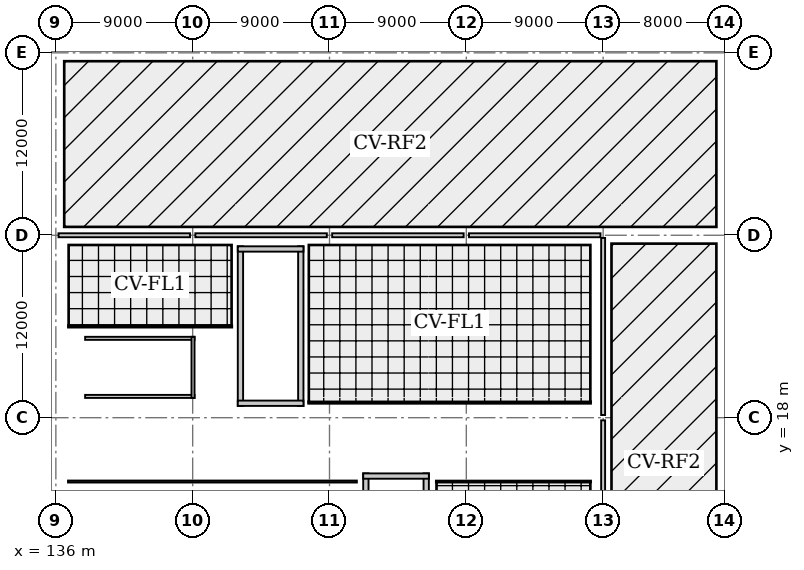
"""IFC4 building model, lengths in metres.
Left out: names, types, materials, properties, quantities, classifications, styles, units other than length and angle.
Written with IfcOpenShell. Run it as: python <this file> out.ifc"""

import sys

from ifc_helpers import new_model, si_unit, direction, frame, frame_2d, origin, origin_2d, place, context, subcontext, project, spatial, rectangle, i_section, extrude, element, fill, save


model = new_model("IFC4")
c1 = context("Model", 3, precision=1e-05, world=origin(), true_north=direction((0.0, 1.0)))
c2 = subcontext(c1, "Body", "Model", "MODEL_VIEW")
j1 = project(units=[si_unit("LENGTHUNIT", "METRE"), si_unit("PLANEANGLEUNIT", "RADIAN")], contexts=[c1])
p1 = place(None, origin())
s1 = spatial("IfcSite", under=j1, at=p1, CompositionType="ELEMENT")
p2 = place(p1, origin())
s2 = spatial("IfcBuilding", under=s1, at=p2, CompositionType="ELEMENT")
p3 = place(p2, frame((0.0, 0.0, 14.4)))
s3 = spatial("IfcBuildingStorey", under=s2, at=p3, CompositionType="ELEMENT", Elevation=14.4)
for number, where, z_axis, x_axis in (
    (1, (136.0, 18.0, 0.0), (0.0, 0.0, 1.0), (1.0, 0.0, 0.0)),
    (2, (136.0, 30.0, 0.0), (0.0, 0.0, 1.0), (1.0, 0.0, 0.0)),
    (3, (145.0, 18.0, 0.0), (0.0, 0.0, 1.0), (1.0, 0.0, 0.0)),
    (4, (145.0, 30.0, 0.0), (0.0, 0.0, 1.0), (1.0, 0.0, 0.0)),
    (5, (154.0, 18.0, 0.0), (0.0, 0.0, 1.0), (1.0, 0.0, 0.0)),
    (6, (154.0, 30.0, 0.0), (0.0, 0.0, 1.0), (1.0, 0.0, 0.0)),
    (7, (163.0, 18.0, 0.0), (0.0, 0.0, 1.0), (1.0, 0.0, 0.0)),
    (8, (163.0, 30.0, 0.0), (0.0, 0.0, 1.0), (1.0, 0.0, 0.0)),
    (9, (172.0, 18.0, 0.0), (0.0, 0.0, 1.0), (1.0, 0.0, 0.0)),
    (10, (172.0, 30.0, 0.0), (0.0, 0.0, 1.0), (1.0, 0.0, 0.0)),
):
    element("IfcColumn", number, at=place(p3, frame(where, z_axis=z_axis, x_axis=x_axis)), inside=s3, PredefinedType="COLUMN", context=c2, shape_type="SweptSolid", body=[
        extrude(i_section(OverallWidth=0.35, OverallDepth=0.35, WebThickness=0.012, FlangeThickness=0.019, FilletRadius=0.02, at=origin_2d()), origin(), (0.0, 0.0, 1.0), 3.2),
    ])
p4 = place(p3, frame((136.175, 30.0, 0.0), z_axis=(0.0, 0.0, 1.0), x_axis=(1.0, 0.0, 0.0)))
e11 = element("IfcWall", 11, at=p4, inside=s3, PredefinedType="SOLIDWALL", context=c2, shape_type="SweptSolid", body=[
    extrude(rectangle(XDim=8.65, YDim=0.26, at=frame_2d((4.325, 0.0))), origin(), (0.0, 0.0, 1.0), 2.42),
])
p5 = place(p4, frame((3.625, 0.0, 0.75)))
e12 = element("IfcOpeningElement", 12, at=p5, cuts=e11, PredefinedType="OPENING", context=c2, shape_type="SweptSolid", body=[
    extrude(rectangle(XDim=1.4, YDim=1.55, at=frame_2d((0.7, 0.775))), frame((0.0, 0.14, 0.0), z_axis=(0.0, -1.0, 0.0), x_axis=(1.0, 0.0, 0.0)), (0.0, 0.0, 1.0), 0.28),
])
p6 = place(p3, frame((145.175, 30.0, 0.0), z_axis=(0.0, 0.0, 1.0), x_axis=(1.0, 0.0, 0.0)))
e13 = element("IfcWall", 13, at=p6, inside=s3, PredefinedType="SOLIDWALL", context=c2, shape_type="SweptSolid", body=[
    extrude(rectangle(XDim=8.65, YDim=0.26, at=frame_2d((4.325, 0.0))), origin(), (0.0, 0.0, 1.0), 2.42),
])
p7 = place(p6, frame((2.994, 0.0, 0.0)))
e14 = element("IfcOpeningElement", 14, at=p7, cuts=e13, PredefinedType="OPENING", context=c2, shape_type="SweptSolid", body=[
    extrude(rectangle(XDim=1.6, YDim=2.3, at=frame_2d((0.8, 1.15))), frame((0.0, 0.14, 0.0), z_axis=(0.0, -1.0, 0.0), x_axis=(1.0, 0.0, 0.0)), (0.0, 0.0, 1.0), 0.28),
])
p8 = place(p3, frame((154.175, 30.0, 0.0), z_axis=(0.0, 0.0, 1.0), x_axis=(1.0, 0.0, 0.0)))
e15 = element("IfcWall", 15, at=p8, inside=s3, PredefinedType="SOLIDWALL", context=c2, shape_type="SweptSolid", body=[
    extrude(rectangle(XDim=8.65, YDim=0.26, at=frame_2d((4.325, 0.0))), origin(), (0.0, 0.0, 1.0), 2.42),
])
p9 = place(p8, frame((3.625, 0.0, 0.75)))
e16 = element("IfcOpeningElement", 16, at=p9, cuts=e15, PredefinedType="OPENING", context=c2, shape_type="SweptSolid", body=[
    extrude(rectangle(XDim=1.4, YDim=1.55, at=frame_2d((0.7, 0.775))), frame((0.0, 0.14, 0.0), z_axis=(0.0, -1.0, 0.0), x_axis=(1.0, 0.0, 0.0)), (0.0, 0.0, 1.0), 0.28),
])
p10 = place(p3, frame((163.175, 30.0, 0.0), z_axis=(0.0, 0.0, 1.0), x_axis=(1.0, 0.0, 0.0)))
e17 = element("IfcWall", 17, at=p10, inside=s3, PredefinedType="SOLIDWALL", context=c2, shape_type="SweptSolid", body=[
    extrude(rectangle(XDim=8.65, YDim=0.26, at=frame_2d((4.325, 0.0))), origin(), (0.0, 0.0, 1.0), 2.42),
])
p11 = place(p10, frame((3.078, 0.0, 0.0)))
e18 = element("IfcOpeningElement", 18, at=p11, cuts=e17, PredefinedType="OPENING", context=c2, shape_type="SweptSolid", body=[
    extrude(rectangle(XDim=1.4, YDim=2.25, at=frame_2d((0.7, 1.125))), frame((0.0, 0.14, 0.0), z_axis=(0.0, -1.0, 0.0), x_axis=(1.0, 0.0, 0.0)), (0.0, 0.0, 1.0), 0.28),
])
p12 = place(p3, frame((172.0, 29.825, 0.0), z_axis=(0.0, 0.0, 1.0), x_axis=(0.0, -1.0, 0.0)))
e19 = element("IfcWall", 19, at=p12, inside=s3, PredefinedType="SOLIDWALL", context=c2, shape_type="SweptSolid", body=[
    extrude(rectangle(XDim=11.65, YDim=0.26, at=frame_2d((5.825, 0.0))), origin(), (0.0, 0.0, 1.0), 2.42),
])
p13 = place(p12, frame((5.125, 0.0, 0.75)))
e20 = element("IfcOpeningElement", 20, at=p13, cuts=e19, PredefinedType="OPENING", context=c2, shape_type="SweptSolid", body=[
    extrude(rectangle(XDim=1.4, YDim=1.55, at=frame_2d((0.7, 0.775))), frame((0.0, 0.14, 0.0), z_axis=(0.0, -1.0, 0.0), x_axis=(1.0, 0.0, 0.0)), (0.0, 0.0, 1.0), 0.28),
])
p14 = place(p3, frame((172.0, 17.825, 0.0), z_axis=(0.0, 0.0, 1.0), x_axis=(0.0, -1.0, 0.0)))
e21 = element("IfcWall", 21, at=p14, inside=s3, PredefinedType="SOLIDWALL", context=c2, shape_type="SweptSolid", body=[
    extrude(rectangle(XDim=8.65, YDim=0.26, at=frame_2d((4.325, 0.0))), origin(), (0.0, 0.0, 1.0), 2.42),
])
p15 = place(p14, frame((3.625, 0.0, 0.75)))
e22 = element("IfcOpeningElement", 22, at=p15, cuts=e21, PredefinedType="OPENING", context=c2, shape_type="SweptSolid", body=[
    extrude(rectangle(XDim=1.4, YDim=1.55, at=frame_2d((0.7, 0.775))), frame((0.0, 0.14, 0.0), z_axis=(0.0, -1.0, 0.0), x_axis=(1.0, 0.0, 0.0)), (0.0, 0.0, 1.0), 0.28),
])
for number, where, z_axis, x_axis in (
    (23, (152.113, 18.775, 0.0), (0.0, 0.0, 1.0), (0.0, 1.0, 0.0)),
    (24, (148.143, 29.272, 0.0), (0.0, 0.0, 1.0), (0.0, -1.0, 0.0)),
):
    element("IfcWall", number, at=place(p3, frame(where, z_axis=z_axis, x_axis=x_axis)), inside=s3, PredefinedType="SHEAR", context=c2, shape_type="SweptSolid", body=[
        extrude(rectangle(XDim=10.498, YDim=0.35, at=frame_2d((5.249, 0.0))), origin(), (0.0, 0.0, 1.0), 2.995),
    ])
p16 = place(p3, frame((152.288, 29.097, 0.0), z_axis=(0.0, 0.0, 1.0), x_axis=(-1.0, 0.0, 0.0)))
e25 = element("IfcWall", 25, at=p16, inside=s3, PredefinedType="SHEAR", context=c2, shape_type="SweptSolid", body=[
    extrude(rectangle(XDim=4.32, YDim=0.35, at=frame_2d((2.16, 0.0))), origin(), (0.0, 0.0, 1.0), 2.995),
])
p17 = place(p3, frame((147.968, 18.95, 0.0), z_axis=(0.0, 0.0, 1.0), x_axis=(1.0, 0.0, 0.0)))
e26 = element("IfcWall", 26, at=p17, inside=s3, PredefinedType="SHEAR", context=c2, shape_type="SweptSolid", body=[
    extrude(rectangle(XDim=4.32, YDim=0.35, at=frame_2d((2.16, 0.0))), origin(), (0.0, 0.0, 1.0), 2.995),
])
p18 = place(p17, frame((0.95, 0.0, 0.0)))
e27 = element("IfcOpeningElement", 27, at=p18, cuts=e26, PredefinedType="OPENING", context=c2, shape_type="SweptSolid", body=[
    extrude(rectangle(XDim=1.3, YDim=2.1, at=frame_2d((0.65, 1.05))), frame((0.0, 0.185, 0.0), z_axis=(0.0, -1.0, 0.0), x_axis=(1.0, 0.0, 0.0)), (0.0, 0.0, 1.0), 0.37),
])
p19 = place(p3, frame((160.363, 3.837, 0.0), z_axis=(0.0, 0.0, 1.0), x_axis=(0.0, 1.0, 0.0)))
e28 = element("IfcWall", 28, at=p19, inside=s3, PredefinedType="SHEAR", context=c2, shape_type="SweptSolid", body=[
    extrude(rectangle(XDim=10.498, YDim=0.35, at=frame_2d((5.249, 0.0))), origin(), (0.0, 0.0, 1.0), 2.995),
])
p20 = place(p3, frame((156.393, 14.335, 0.0), z_axis=(0.0, 0.0, 1.0), x_axis=(0.0, -1.0, 0.0)))
e29 = element("IfcWall", 29, at=p20, inside=s3, PredefinedType="SHEAR", context=c2, shape_type="SweptSolid", body=[
    extrude(rectangle(XDim=10.498, YDim=0.35, at=frame_2d((5.249, 0.0))), origin(), (0.0, 0.0, 1.0), 2.995),
])
p21 = place(p20, frame((8.397, 0.0, 0.0)))
e30 = element("IfcOpeningElement", 30, at=p21, cuts=e29, PredefinedType="OPENING", context=c2, shape_type="SweptSolid", body=[
    extrude(rectangle(XDim=1.3, YDim=2.1, at=frame_2d((0.65, 1.05))), frame((0.0, 0.185, 0.0), z_axis=(0.0, -1.0, 0.0), x_axis=(1.0, 0.0, 0.0)), (0.0, 0.0, 1.0), 0.37),
])
p22 = place(p3, frame((160.538, 14.16, 0.0), z_axis=(0.0, 0.0, 1.0), x_axis=(-1.0, 0.0, 0.0)))
e31 = element("IfcWall", 31, at=p22, inside=s3, PredefinedType="SHEAR", context=c2, shape_type="SweptSolid", body=[
    extrude(rectangle(XDim=4.32, YDim=0.35, at=frame_2d((2.16, 0.0))), origin(), (0.0, 0.0, 1.0), 2.995),
])
for number, where, z_axis, x_axis in (
    (32, (137.925, 19.4, 0.0), (0.0, 0.0, 1.0), (1.0, 0.0, 0.0)),
    (33, (145.123, 23.22, 0.0), (0.0, 0.0, 1.0), (-1.0, 0.0, 0.0)),
):
    element("IfcWall", number, at=place(p3, frame(where, z_axis=z_axis, x_axis=x_axis)), inside=s3, PredefinedType="SOLIDWALL", context=c2, shape_type="SweptSolid", body=[
        extrude(rectangle(XDim=7.198, YDim=0.2, at=frame_2d((3.599, 0.0))), origin(), (0.0, 0.0, 1.0), 1.25),
    ])
p23 = place(p3, frame((145.022, 19.3, 0.0), z_axis=(0.0, 0.0, 1.0), x_axis=(0.0, 1.0, 0.0)))
e34 = element("IfcWall", 34, at=p23, inside=s3, PredefinedType="SOLIDWALL", context=c2, shape_type="SweptSolid", body=[
    extrude(rectangle(XDim=4.02, YDim=0.2, at=frame_2d((2.01, 0.0))), origin(), (0.0, 0.0, 1.0), 1.25),
])
p24 = place(p3, frame((171.2, 19.0, 0.0), z_axis=(0.0, 0.0, 1.0), x_axis=(-1.0, 0.0, 0.0)))
e35 = element("IfcWall", 35, at=p24, inside=s3, PredefinedType="PARTITIONING", context=c2, shape_type="SweptSolid", body=[
    extrude(rectangle(XDim=18.6, YDim=0.16, at=frame_2d((9.3, 0.0))), origin(), (0.0, 0.0, 1.0), 2.42),
])
p25 = place(p24, frame((8.975, 0.0, 0.0)))
e36 = element("IfcOpeningElement", 36, at=p25, cuts=e35, PredefinedType="OPENING", context=c2, shape_type="SweptSolid", body=[
    extrude(rectangle(XDim=1.65, YDim=2.1, at=frame_2d((0.825, 1.05))), frame((0.0, 0.09, 0.0), z_axis=(0.0, -1.0, 0.0), x_axis=(1.0, 0.0, 0.0)), (0.0, 0.0, 1.0), 0.18),
])
p26 = place(p3, frame((147.6, 24.0, 0.0), z_axis=(0.0, 0.0, 1.0), x_axis=(-1.0, 0.0, 0.0)))
e37 = element("IfcWall", 37, at=p26, inside=s3, PredefinedType="PARTITIONING", context=c2, shape_type="SweptSolid", body=[
    extrude(rectangle(XDim=10.8, YDim=0.14, at=frame_2d((5.4, 0.0))), origin(), (0.0, 0.0, 1.0), 2.42),
])
p27 = place(p26, frame((4.775, 0.0, 0.0)))
e38 = element("IfcOpeningElement", 38, at=p27, cuts=e37, PredefinedType="OPENING", context=c2, shape_type="SweptSolid", body=[
    extrude(rectangle(XDim=1.25, YDim=2.1, at=frame_2d((0.625, 1.05))), frame((0.0, 0.08, 0.0), z_axis=(0.0, -1.0, 0.0), x_axis=(1.0, 0.0, 0.0)), (0.0, 0.0, 1.0), 0.16),
])
p28 = place(p3, frame((136.8, 13.8, 0.0), z_axis=(0.0, 0.0, 1.0), x_axis=(1.0, 0.0, 0.0)))
e39 = element("IfcWall", 39, at=p28, inside=s3, PredefinedType="PARTITIONING", context=c2, shape_type="SweptSolid", body=[
    extrude(rectangle(XDim=19.0, YDim=0.13, at=frame_2d((9.5, 0.0))), origin(), (0.0, 0.0, 1.0), 2.58),
])
p29 = place(p28, frame((8.725, 0.0, 0.0)))
e40 = element("IfcOpeningElement", 40, at=p29, cuts=e39, PredefinedType="OPENING", context=c2, shape_type="SweptSolid", body=[
    extrude(rectangle(XDim=1.55, YDim=2.1, at=frame_2d((0.775, 1.05))), frame((0.0, 0.075, 0.0), z_axis=(0.0, -1.0, 0.0), x_axis=(1.0, 0.0, 0.0)), (0.0, 0.0, 1.0), 0.15),
])
p30 = place(p28, frame((14.44, 0.0, 0.0)))
e41 = element("IfcOpeningElement", 41, at=p30, cuts=e39, PredefinedType="OPENING", context=c2, shape_type="SweptSolid", body=[
    extrude(rectangle(XDim=1.55, YDim=2.1, at=frame_2d((0.775, 1.05))), frame((0.0, 0.075, 0.0), z_axis=(0.0, -1.0, 0.0), x_axis=(1.0, 0.0, 0.0)), (0.0, 0.0, 1.0), 0.15),
])
p31 = place(p3, frame((161.0, 13.8, 0.0), z_axis=(0.0, 0.0, 1.0), x_axis=(1.0, 0.0, 0.0)))
e42 = element("IfcWall", 42, at=p31, inside=s3, PredefinedType="PARTITIONING", context=c2, shape_type="SweptSolid", body=[
    extrude(rectangle(XDim=10.2, YDim=0.12, at=frame_2d((5.1, 0.0))), origin(), (0.0, 0.0, 1.0), 2.58),
])
p32 = place(p31, frame((4.425, 0.0, 0.0)))
e43 = element("IfcOpeningElement", 43, at=p32, cuts=e42, PredefinedType="OPENING", context=c2, shape_type="SweptSolid", body=[
    extrude(rectangle(XDim=1.35, YDim=2.1, at=frame_2d((0.675, 1.05))), frame((0.0, 0.07, 0.0), z_axis=(0.0, -1.0, 0.0), x_axis=(1.0, 0.0, 0.0)), (0.0, 0.0, 1.0), 0.14),
])
p33 = place(p5, origin())
e44 = element("IfcWindow", 44, at=p33, inside=s3, PartitioningType="SINGLE_PANEL", PredefinedType="WINDOW", context=c2, shape_type="SweptSolid", body=[
    extrude(rectangle(XDim=1.4, YDim=1.55, at=frame_2d((0.7, 0.775))), frame((0.0, 0.03, 0.0), z_axis=(0.0, -1.0, 0.0), x_axis=(1.0, 0.0, 0.0)), (0.0, 0.0, 1.0), 0.06),
])
fill(e12, e44)
p34 = place(p7, origin())
e45 = element("IfcDoor", 45, at=p34, inside=s3, OperationType="SINGLE_SWING_LEFT", PredefinedType="DOOR", context=c2, shape_type="SweptSolid", body=[
    extrude(rectangle(XDim=1.6, YDim=2.3, at=frame_2d((0.8, 1.15))), frame((0.0, 0.025, 0.0), z_axis=(0.0, -1.0, 0.0), x_axis=(1.0, 0.0, 0.0)), (0.0, 0.0, 1.0), 0.05),
])
fill(e14, e45)
p35 = place(p9, origin())
e46 = element("IfcWindow", 46, at=p35, inside=s3, PartitioningType="SINGLE_PANEL", PredefinedType="WINDOW", context=c2, shape_type="SweptSolid", body=[
    extrude(rectangle(XDim=1.4, YDim=1.55, at=frame_2d((0.7, 0.775))), frame((0.0, 0.03, 0.0), z_axis=(0.0, -1.0, 0.0), x_axis=(1.0, 0.0, 0.0)), (0.0, 0.0, 1.0), 0.06),
])
fill(e16, e46)
p36 = place(p11, origin())
e47 = element("IfcDoor", 47, at=p36, inside=s3, OperationType="SINGLE_SWING_RIGHT", PredefinedType="DOOR", context=c2, shape_type="SweptSolid", body=[
    extrude(rectangle(XDim=1.4, YDim=2.25, at=frame_2d((0.7, 1.125))), frame((0.0, 0.025, 0.0), z_axis=(0.0, -1.0, 0.0), x_axis=(1.0, 0.0, 0.0)), (0.0, 0.0, 1.0), 0.05),
])
fill(e18, e47)
p37 = place(p13, origin())
e48 = element("IfcWindow", 48, at=p37, inside=s3, PartitioningType="SINGLE_PANEL", PredefinedType="WINDOW", context=c2, shape_type="SweptSolid", body=[
    extrude(rectangle(XDim=1.4, YDim=1.55, at=frame_2d((0.7, 0.775))), frame((0.0, 0.03, 0.0), z_axis=(0.0, -1.0, 0.0), x_axis=(1.0, 0.0, 0.0)), (0.0, 0.0, 1.0), 0.06),
])
fill(e20, e48)
p38 = place(p15, origin())
e49 = element("IfcWindow", 49, at=p38, inside=s3, PartitioningType="SINGLE_PANEL", PredefinedType="WINDOW", context=c2, shape_type="SweptSolid", body=[
    extrude(rectangle(XDim=1.4, YDim=1.55, at=frame_2d((0.7, 0.775))), frame((0.0, 0.03, 0.0), z_axis=(0.0, -1.0, 0.0), x_axis=(1.0, 0.0, 0.0)), (0.0, 0.0, 1.0), 0.06),
])
fill(e22, e49)
p39 = place(p18, origin())
e50 = element("IfcDoor", 50, at=p39, inside=s3, OperationType="SINGLE_SWING_RIGHT", PredefinedType="DOOR", context=c2, shape_type="SweptSolid", body=[
    extrude(rectangle(XDim=1.3, YDim=2.1, at=frame_2d((0.65, 1.05))), frame((0.0, 0.025, 0.0), z_axis=(0.0, -1.0, 0.0), x_axis=(1.0, 0.0, 0.0)), (0.0, 0.0, 1.0), 0.05),
])
fill(e27, e50)
p40 = place(p25, origin())
e51 = element("IfcDoor", 51, at=p40, inside=s3, OperationType="SINGLE_SWING_LEFT", PredefinedType="DOOR", context=c2, shape_type="SweptSolid", body=[
    extrude(rectangle(XDim=1.65, YDim=2.1, at=frame_2d((0.825, 1.05))), frame((0.0, 0.025, 0.0), z_axis=(0.0, -1.0, 0.0), x_axis=(1.0, 0.0, 0.0)), (0.0, 0.0, 1.0), 0.05),
])
fill(e36, e51)
p41 = place(p27, origin())
e52 = element("IfcDoor", 52, at=p41, inside=s3, OperationType="SINGLE_SWING_RIGHT", PredefinedType="DOOR", context=c2, shape_type="SweptSolid", body=[
    extrude(rectangle(XDim=1.25, YDim=2.1, at=frame_2d((0.625, 1.05))), frame((0.0, 0.025, 0.0), z_axis=(0.0, -1.0, 0.0), x_axis=(1.0, 0.0, 0.0)), (0.0, 0.0, 1.0), 0.05),
])
fill(e38, e52)
p42 = place(p29, origin())
e53 = element("IfcDoor", 53, at=p42, inside=s3, OperationType="SINGLE_SWING_LEFT", PredefinedType="DOOR", context=c2, shape_type="SweptSolid", body=[
    extrude(rectangle(XDim=1.55, YDim=2.1, at=frame_2d((0.775, 1.05))), frame((0.0, 0.025, 0.0), z_axis=(0.0, -1.0, 0.0), x_axis=(1.0, 0.0, 0.0)), (0.0, 0.0, 1.0), 0.05),
])
fill(e40, e53)
p43 = place(p30, origin())
e54 = element("IfcDoor", 54, at=p43, inside=s3, OperationType="SINGLE_SWING_RIGHT", PredefinedType="DOOR", context=c2, shape_type="SweptSolid", body=[
    extrude(rectangle(XDim=1.55, YDim=2.1, at=frame_2d((0.775, 1.05))), frame((0.0, 0.025, 0.0), z_axis=(0.0, -1.0, 0.0), x_axis=(1.0, 0.0, 0.0)), (0.0, 0.0, 1.0), 0.05),
])
fill(e41, e54)
p44 = place(p32, origin())
e55 = element("IfcDoor", 55, at=p44, inside=s3, OperationType="SINGLE_SWING_LEFT", PredefinedType="DOOR", context=c2, shape_type="SweptSolid", body=[
    extrude(rectangle(XDim=1.35, YDim=2.1, at=frame_2d((0.675, 1.05))), frame((0.0, 0.025, 0.0), z_axis=(0.0, -1.0, 0.0), x_axis=(1.0, 0.0, 0.0)), (0.0, 0.0, 1.0), 0.05),
])
fill(e43, e55)
save(model, sys.argv[1])
